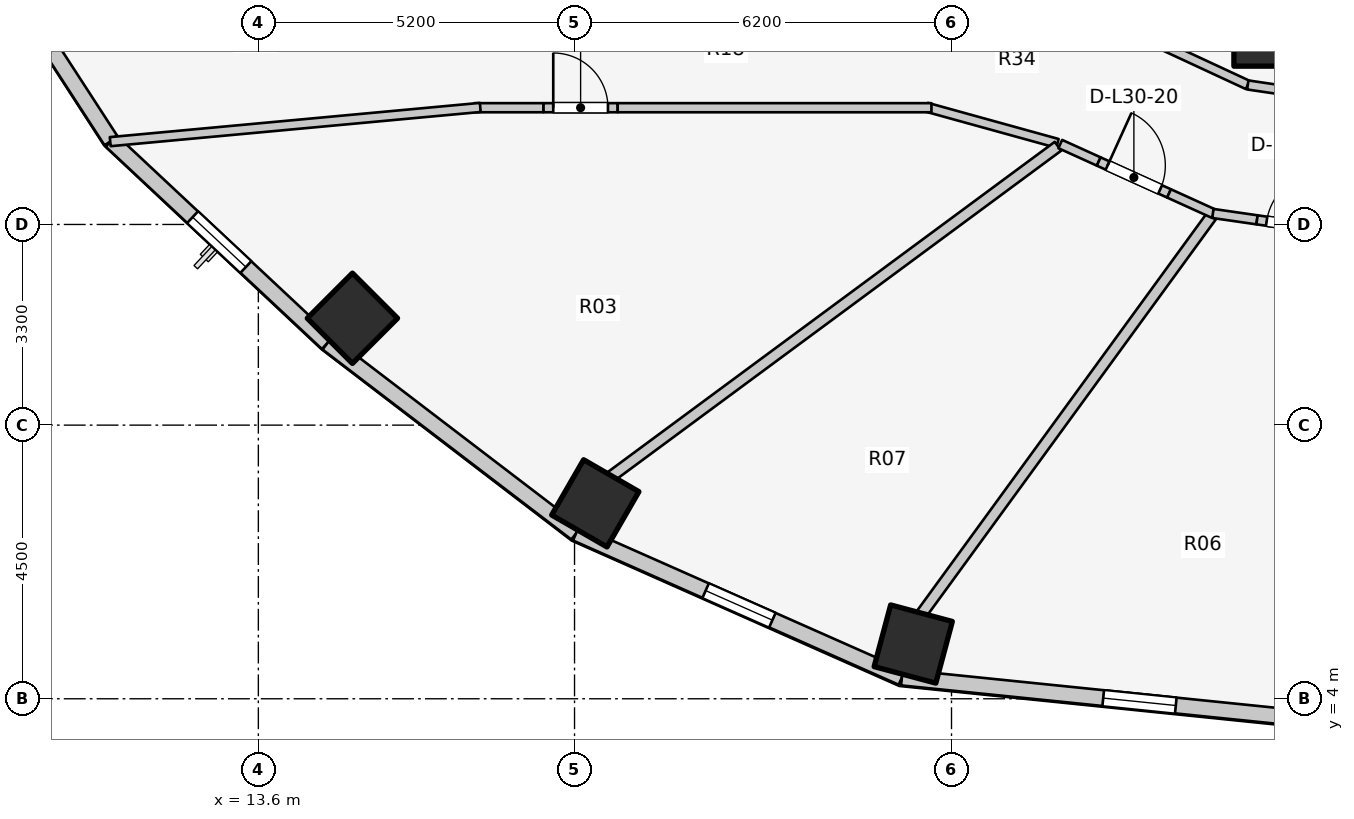
"""IFC4 building model, lengths in metres.
Left out: names, types, materials, properties, quantities, classifications, styles, units other than length and angle.
Written with IfcOpenShell. Run it as: python <this file> out.ifc"""

import sys

from ifc_helpers import new_model, si_unit, direction, frame, frame_2d, origin, origin_2d, place, context, subcontext, project, spatial, rectangle, extrude, element, fill, save


model = new_model("IFC4")
c1 = context("Model", 3, precision=1e-05, world=origin(), true_north=direction((0.0, 1.0)))
c2 = subcontext(c1, "Body", "Model", "MODEL_VIEW")
j1 = project(units=[si_unit("LENGTHUNIT", "METRE"), si_unit("PLANEANGLEUNIT", "RADIAN")], contexts=[c1])
p1 = place(None, origin())
s1 = spatial("IfcSite", under=j1, at=p1, CompositionType="ELEMENT")
p2 = place(p1, origin())
s2 = spatial("IfcBuilding", under=s1, at=p2, CompositionType="ELEMENT")
p3 = place(p2, frame((0.0, 0.0, 101.1)))
s3 = spatial("IfcBuildingStorey", under=s2, at=p3, CompositionType="ELEMENT", Elevation=101.1)
for number, where, z_axis, x_axis in (
    (1, (15.147, 10.257, 0.0), (0.0, 0.0, 1.0), (-0.707, -0.707, 0.0)),
    (2, (19.142, 7.214, 0.0), (0.0, 0.0, 1.0), (-0.5, -0.866, 0.0)),
):
    element("IfcColumn", number, at=place(p3, frame(where, z_axis=z_axis, x_axis=x_axis)), inside=s3, PredefinedType="COLUMN", context=c2, shape_type="SweptSolid", body=[
        extrude(rectangle(XDim=1.05, YDim=1.05, at=origin_2d()), origin(), (0.0, 0.0, 1.0), 3.1),
    ])
p4 = place(p3, frame((30.069, 14.828, 0.0), z_axis=(0.0, 0.0, 1.0), x_axis=(1.0, 0.0, 0.0)))
e3 = element("IfcColumn", 3, at=p4, inside=s3, PredefinedType="COLUMN", context=c2, shape_type="SweptSolid", body=[
    extrude(rectangle(XDim=0.85, YDim=0.85, at=origin_2d()), origin(), (0.0, 0.0, 1.0), 3.1),
])
p5 = place(p3, frame((24.371, 4.9, 0.0), z_axis=(0.0, 0.0, 1.0), x_axis=(-0.258819045103, -0.965925826289, 0.0)))
e4 = element("IfcColumn", 4, at=p5, inside=s3, PredefinedType="COLUMN", context=c2, shape_type="SweptSolid", body=[
    extrude(rectangle(XDim=1.05, YDim=1.05, at=origin_2d()), origin(), (0.0, 0.0, 1.0), 3.1),
])
p6 = place(p3, frame((8.578, 17.181, 0.0), z_axis=(0.0, 0.0, 1.0), x_axis=(0.544388392991, -0.838833283541, 0.0)))
e5 = element("IfcWall", 5, at=p6, inside=s3, PredefinedType="STANDARD", context=c2, shape_type="SweptSolid", body=[
    extrude(rectangle(XDim=4.778, YDim=0.26, at=frame_2d((2.389, 0.0))), origin(), (0.0, 0.0, 1.0), 1.22),
])
p7 = place(p6, frame((1.789, 0.0, 0.15)))
e6 = element("IfcOpeningElement", 6, at=p7, cuts=e5, PredefinedType="OPENING", context=c2, shape_type="SweptSolid", body=[
    extrude(rectangle(XDim=1.2, YDim=0.9, at=frame_2d((0.6, 0.45))), frame((0.0, 0.14, 0.0), z_axis=(0.0, -1.0, 0.0), x_axis=(1.0, 0.0, 0.0)), (0.0, 0.0, 1.0), 0.28),
])
p8 = place(p3, frame((11.179, 13.173, 0.0), z_axis=(0.0, 0.0, 1.0), x_axis=(0.730162452258, -0.68327358599, 0.0)))
e7 = element("IfcWall", 7, at=p8, inside=s3, PredefinedType="STANDARD", context=c2, shape_type="SweptSolid", body=[
    extrude(rectangle(XDim=4.868, YDim=0.26, at=frame_2d((2.434, 0.0))), origin(), (0.0, 0.0, 1.0), 1.22),
])
p9 = place(p8, frame((1.834, 0.0, 0.15)))
e8 = element("IfcOpeningElement", 8, at=p9, cuts=e7, PredefinedType="OPENING", context=c2, shape_type="SweptSolid", body=[
    extrude(rectangle(XDim=1.2, YDim=0.9, at=frame_2d((0.6, 0.45))), frame((0.0, 0.14, 0.0), z_axis=(0.0, -1.0, 0.0), x_axis=(1.0, 0.0, 0.0)), (0.0, 0.0, 1.0), 0.28),
])
p10 = place(p3, frame((14.734, 9.847, 0.0), z_axis=(0.0, 0.0, 1.0), x_axis=(0.794809810864, -0.606858603427, 0.0)))
e9 = element("IfcWall", 9, at=p10, inside=s3, PredefinedType="STANDARD", context=c2, shape_type="SweptSolid", body=[
    extrude(rectangle(XDim=5.149, YDim=0.26, at=frame_2d((2.575, 0.0))), origin(), (0.0, 0.0, 1.0), 1.22),
])
p11 = place(p3, frame((18.827, 6.722, 0.0), z_axis=(0.0, 0.0, 1.0), x_axis=(0.914336605747, -0.404955023911, 0.0)))
e10 = element("IfcWall", 10, at=p11, inside=s3, PredefinedType="STANDARD", context=c2, shape_type="SweptSolid", body=[
    extrude(rectangle(XDim=5.859, YDim=0.26, at=frame_2d((2.929, 0.0))), origin(), (0.0, 0.0, 1.0), 1.22),
])
p12 = place(p11, frame((2.329, 0.0, 0.15)))
e11 = element("IfcOpeningElement", 11, at=p12, cuts=e10, PredefinedType="OPENING", context=c2, shape_type="SweptSolid", body=[
    extrude(rectangle(XDim=1.2, YDim=0.9, at=frame_2d((0.6, 0.45))), frame((0.0, 0.14, 0.0), z_axis=(0.0, -1.0, 0.0), x_axis=(1.0, 0.0, 0.0)), (0.0, 0.0, 1.0), 0.28),
])
p13 = place(p3, frame((24.184, 4.349, 0.0), z_axis=(0.0, 0.0, 1.0), x_axis=(0.994821390558, -0.101638579726, 0.0)))
e12 = element("IfcWall", 12, at=p13, inside=s3, PredefinedType="STANDARD", context=c2, shape_type="SweptSolid", body=[
    extrude(rectangle(XDim=7.857, YDim=0.26, at=frame_2d((3.929, 0.0))), origin(), (0.0, 0.0, 1.0), 1.22),
])
p14 = place(p13, frame((3.329, 0.0, 0.15)))
e13 = element("IfcOpeningElement", 13, at=p14, cuts=e12, PredefinedType="OPENING", context=c2, shape_type="SweptSolid", body=[
    extrude(rectangle(XDim=1.2, YDim=0.9, at=frame_2d((0.6, 0.45))), frame((0.0, 0.14, 0.0), z_axis=(0.0, -1.0, 0.0), x_axis=(1.0, 0.0, 0.0)), (0.0, 0.0, 1.0), 0.28),
])
p15 = place(p3, frame((27.89, 15.015, 0.0), z_axis=(0.0, 0.0, 1.0), x_axis=(0.906943449489, -0.421252393975, 0.0)))
e14 = element("IfcWall", 14, at=p15, inside=s3, PredefinedType="PARTITIONING", context=c2, shape_type="SweptSolid", body=[
    extrude(rectangle(XDim=2.186, YDim=0.15, at=frame_2d((1.093, 0.0))), origin(), (0.0, 0.0, 1.0), 1.992),
])
p16 = place(p3, frame((29.873, 14.094, 0.0), z_axis=(0.0, 0.0, 1.0), x_axis=(0.989268584896, -0.146108408166, 0.0)))
e15 = element("IfcWall", 15, at=p16, inside=s3, PredefinedType="PARTITIONING", context=c2, shape_type="SweptSolid", body=[
    extrude(rectangle(XDim=2.151, YDim=0.15, at=frame_2d((1.075, 0.0))), origin(), (0.0, 0.0, 1.0), 1.992),
])
p17 = place(p3, frame((26.742, 13.133, 0.0), z_axis=(0.0, 0.0, 1.0), x_axis=(-0.963833843713, 0.266503886865, 0.0)))
e16 = element("IfcWall", 16, at=p17, inside=s3, PredefinedType="PARTITIONING", context=c2, shape_type="SweptSolid", body=[
    extrude(rectangle(XDim=2.232, YDim=0.15, at=frame_2d((1.116, 0.0))), origin(), (0.0, 0.0, 1.0), 1.992),
])
p18 = place(p3, frame((17.15, 13.72, 0.0), z_axis=(0.0, 0.0, 1.0), x_axis=(1.0, 0.0, 0.0)))
e17 = element("IfcWall", 17, at=p18, inside=s3, PredefinedType="PARTITIONING", context=c2, shape_type="SweptSolid", body=[
    extrude(rectangle(XDim=1.14, YDim=0.15, at=frame_2d((0.57, 0.0))), origin(), (0.0, 0.0, 1.0), 2.575),
])
p19 = place(p3, frame((18.29, 13.72, 0.0), z_axis=(0.0, 0.0, 1.0), x_axis=(1.0, 0.0, 0.0)))
e18 = element("IfcWall", 18, at=p19, inside=s3, PredefinedType="PARTITIONING", context=c2, shape_type="SweptSolid", body=[
    extrude(rectangle(XDim=1.22, YDim=0.15, at=frame_2d((0.61, 0.0))), origin(), (0.0, 0.0, 1.0), 2.575),
])
p20 = place(p19, frame((0.16, 0.0, 0.0)))
e19 = element("IfcOpeningElement", 19, at=p20, cuts=e18, PredefinedType="OPENING", context=c2, shape_type="SweptSolid", body=[
    extrude(rectangle(XDim=0.9, YDim=2.1, at=frame_2d((0.45, 1.05))), frame((0.0, 0.085, 0.0), z_axis=(0.0, -1.0, 0.0), x_axis=(1.0, 0.0, 0.0)), (0.0, 0.0, 1.0), 0.17),
])
p21 = place(p3, frame((19.51, 13.72, 0.0), z_axis=(0.0, 0.0, 1.0), x_axis=(1.0, 0.0, 0.0)))
e20 = element("IfcWall", 20, at=p21, inside=s3, PredefinedType="PARTITIONING", context=c2, shape_type="SweptSolid", body=[
    extrude(rectangle(XDim=5.16, YDim=0.15, at=frame_2d((2.58, 0.0))), origin(), (0.0, 0.0, 1.0), 1.992),
])
p22 = place(p3, frame((17.25, 13.725, 0.0), z_axis=(0.0, 0.0, 1.0), x_axis=(-0.995748209098, -0.092116795851, 0.0)))
e21 = element("IfcWall", 21, at=p22, inside=s3, PredefinedType="PARTITIONING", context=c2, shape_type="SweptSolid", body=[
    extrude(rectangle(XDim=6.112, YDim=0.15, at=frame_2d((3.056, 0.0))), origin(), (0.0, 0.0, 1.0), 1.22),
])
p23 = place(p3, frame((26.751, 13.086, 0.0), z_axis=(0.0, 0.0, 1.0), x_axis=(-0.80430981394, -0.594210167533, 0.0)))
e22 = element("IfcWall", 22, at=p23, inside=s3, PredefinedType="PARTITIONING", context=c2, shape_type="SweptSolid", body=[
    extrude(rectangle(XDim=9.146, YDim=0.18, at=frame_2d((4.573, 0.0))), origin(), (0.0, 0.0, 1.0), 1.22),
])
p24 = place(p3, frame((29.273, 11.934, 0.0), z_axis=(0.0, 0.0, 1.0), x_axis=(-0.589042211476, -0.808102266486, 0.0)))
e23 = element("IfcWall", 23, at=p24, inside=s3, PredefinedType="PARTITIONING", context=c2, shape_type="SweptSolid", body=[
    extrude(rectangle(XDim=8.101, YDim=0.18, at=frame_2d((4.051, 0.0))), origin(), (0.0, 0.0, 1.0), 1.22),
])
p25 = place(p3, frame((26.789, 13.123, 0.0), z_axis=(0.0, 0.0, 1.0), x_axis=(0.910534957096, -0.413432088627, 0.0)))
e24 = element("IfcWall", 24, at=p25, inside=s3, PredefinedType="PARTITIONING", context=c2, shape_type="SweptSolid", body=[
    extrude(rectangle(XDim=0.694, YDim=0.15, at=frame_2d((0.347, 0.0))), origin(), (0.0, 0.0, 1.0), 2.575),
])
p26 = place(p3, frame((27.421, 12.835, 0.0), z_axis=(0.0, 0.0, 1.0), x_axis=(0.910563905594, -0.413368327075, 0.0)))
e25 = element("IfcWall", 25, at=p26, inside=s3, PredefinedType="PARTITIONING", context=c2, shape_type="SweptSolid", body=[
    extrude(rectangle(XDim=1.27, YDim=0.15, at=frame_2d((0.635, 0.0))), origin(), (0.0, 0.0, 1.0), 2.16),
])
p27 = place(p26, frame((0.16, 0.0, 0.0)))
e26 = element("IfcOpeningElement", 26, at=p27, cuts=e25, PredefinedType="OPENING", context=c2, shape_type="SweptSolid", body=[
    extrude(rectangle(XDim=0.95, YDim=2.1, at=frame_2d((0.475, 1.05))), frame((0.0, 0.085, 0.0), z_axis=(0.0, -1.0, 0.0), x_axis=(1.0, 0.0, 0.0)), (0.0, 0.0, 1.0), 0.17),
])
p28 = place(p3, frame((28.577, 12.311, 0.0), z_axis=(0.0, 0.0, 1.0), x_axis=(0.910604459832, -0.413278982932, 0.0)))
e27 = element("IfcWall", 27, at=p28, inside=s3, PredefinedType="PARTITIONING", context=c2, shape_type="SweptSolid", body=[
    extrude(rectangle(XDim=0.808, YDim=0.15, at=frame_2d((0.404, 0.0))), origin(), (0.0, 0.0, 1.0), 1.992),
])
p29 = place(p3, frame((29.299, 11.981, 0.0), z_axis=(0.0, 0.0, 1.0), x_axis=(0.98974875873, -0.142819447526, 0.0)))
e28 = element("IfcWall", 28, at=p29, inside=s3, PredefinedType="PARTITIONING", context=c2, shape_type="SweptSolid", body=[
    extrude(rectangle(XDim=0.733, YDim=0.15, at=frame_2d((0.367, 0.0))), origin(), (0.0, 0.0, 1.0), 2.575),
])
p30 = place(p3, frame((30.024, 11.876, 0.0), z_axis=(0.0, 0.0, 1.0), x_axis=(0.98974859422, -0.142820587591, 0.0)))
e29 = element("IfcWall", 29, at=p30, inside=s3, PredefinedType="PARTITIONING", context=c2, shape_type="SweptSolid", body=[
    extrude(rectangle(XDim=1.27, YDim=0.15, at=frame_2d((0.635, 0.0))), origin(), (0.0, 0.0, 1.0), 2.575),
])
p31 = place(p30, frame((0.16, 0.0, 0.0)))
e30 = element("IfcOpeningElement", 30, at=p31, cuts=e29, PredefinedType="OPENING", context=c2, shape_type="SweptSolid", body=[
    extrude(rectangle(XDim=0.95, YDim=2.1, at=frame_2d((0.475, 1.05))), frame((0.0, 0.085, 0.0), z_axis=(0.0, -1.0, 0.0), x_axis=(1.0, 0.0, 0.0)), (0.0, 0.0, 1.0), 0.17),
])
p32 = place(p9, origin())
e31 = element("IfcWindow", 31, at=p32, inside=s3, PartitioningType="SINGLE_PANEL", PredefinedType="WINDOW", context=c2, shape_type="SweptSolid", body=[
    extrude(rectangle(XDim=1.2, YDim=0.9, at=frame_2d((0.6, 0.45))), frame((0.0, 0.03, 0.0), z_axis=(0.0, -1.0, 0.0), x_axis=(1.0, 0.0, 0.0)), (0.0, 0.0, 1.0), 0.06),
])
fill(e8, e31)
p33 = place(p12, origin())
e32 = element("IfcWindow", 32, at=p33, inside=s3, PartitioningType="SINGLE_PANEL", PredefinedType="WINDOW", context=c2, shape_type="SweptSolid", body=[
    extrude(rectangle(XDim=1.2, YDim=0.9, at=frame_2d((0.6, 0.45))), frame((0.0, 0.03, 0.0), z_axis=(0.0, -1.0, 0.0), x_axis=(1.0, 0.0, 0.0)), (0.0, 0.0, 1.0), 0.06),
])
fill(e11, e32)
p34 = place(p14, origin())
e33 = element("IfcWindow", 33, at=p34, inside=s3, PartitioningType="SINGLE_PANEL", PredefinedType="WINDOW", context=c2, shape_type="SweptSolid", body=[
    extrude(rectangle(XDim=1.2, YDim=0.9, at=frame_2d((0.6, 0.45))), frame((0.0, 0.03, 0.0), z_axis=(0.0, -1.0, 0.0), x_axis=(1.0, 0.0, 0.0)), (0.0, 0.0, 1.0), 0.06),
])
fill(e13, e33)
p35 = place(p20, origin())
e34 = element("IfcDoor", 34, at=p35, inside=s3, OperationType="SINGLE_SWING_LEFT", PredefinedType="DOOR", context=c2, shape_type="SweptSolid", body=[
    extrude(rectangle(XDim=0.9, YDim=2.1, at=frame_2d((0.45, 1.05))), frame((0.0, 0.025, 0.0), z_axis=(0.0, -1.0, 0.0), x_axis=(1.0, 0.0, 0.0)), (0.0, 0.0, 1.0), 0.05),
])
fill(e19, e34)
p36 = place(p27, origin())
e35 = element("IfcDoor", 35, at=p36, inside=s3, OperationType="SINGLE_SWING_LEFT", PredefinedType="DOOR", context=c2, shape_type="SweptSolid", body=[
    extrude(rectangle(XDim=0.95, YDim=2.1, at=frame_2d((0.475, 1.05))), frame((0.0, 0.025, 0.0), z_axis=(0.0, -1.0, 0.0), x_axis=(1.0, 0.0, 0.0)), (0.0, 0.0, 1.0), 0.05),
])
fill(e26, e35)
p37 = place(p31, origin())
e36 = element("IfcDoor", 36, at=p37, inside=s3, OperationType="SINGLE_SWING_RIGHT", PredefinedType="DOOR", context=c2, shape_type="SweptSolid", body=[
    extrude(rectangle(XDim=0.95, YDim=2.1, at=frame_2d((0.475, 1.05))), frame((0.0, 0.025, 0.0), z_axis=(0.0, -1.0, 0.0), x_axis=(1.0, 0.0, 0.0)), (0.0, 0.0, 1.0), 0.05),
])
fill(e30, e36)
save(model, sys.argv[1])
